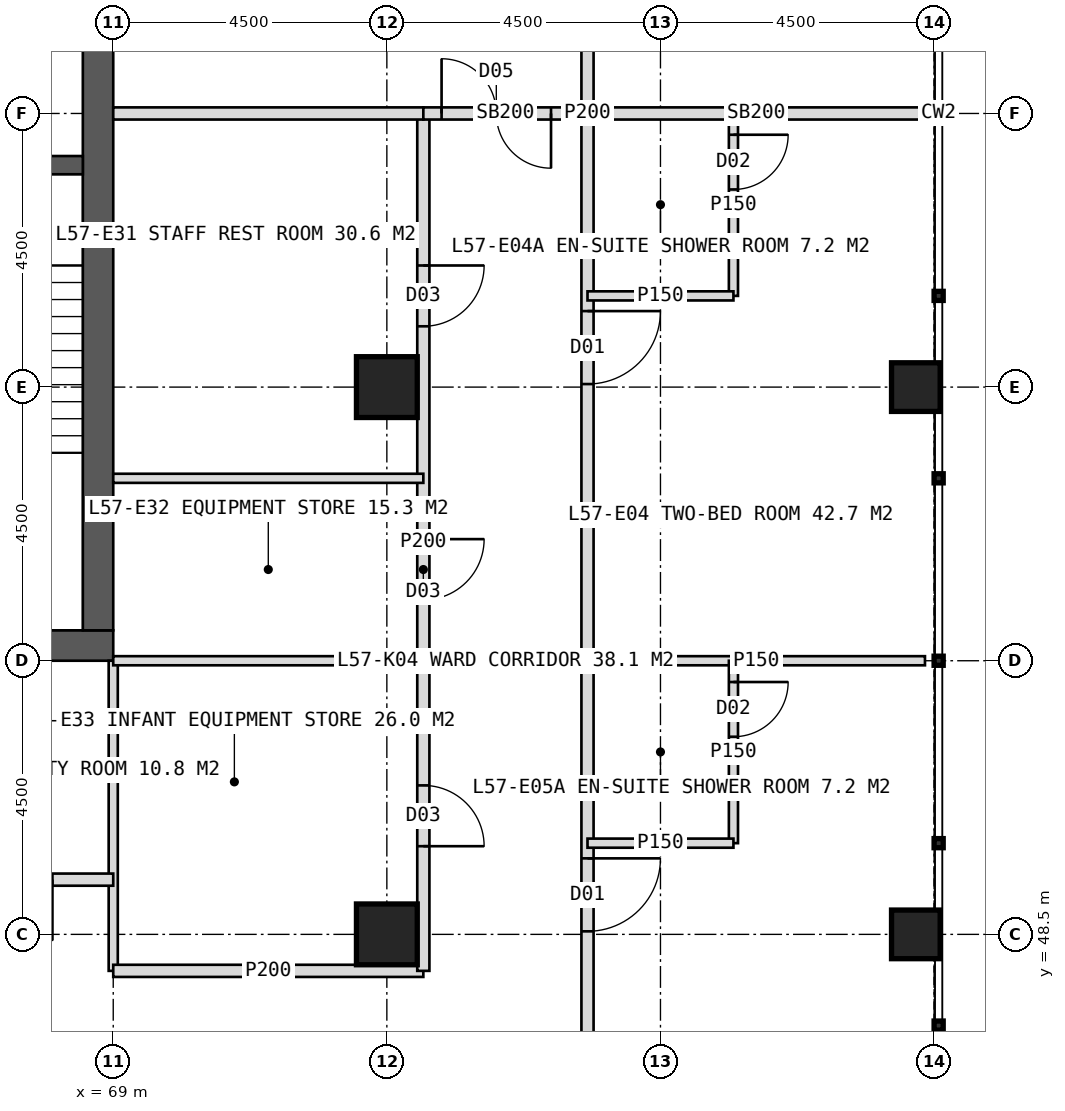
"""IFC4 building model, lengths in metres.
Left out: names, types, materials, properties, quantities, classifications, styles, units other than length and angle.
Written with IfcOpenShell. Run it as: python <this file> out.ifc"""

import sys

from ifc_helpers import new_model, si_unit, direction, frame, frame_2d, origin, origin_2d, place, context, subcontext, project, spatial, rectangle, hollow_rectangle, extrude, element, fill, save


model = new_model("IFC4")
c1 = context("Model", 3, precision=1e-05, world=origin(), true_north=direction((0.0, 1.0)))
c2 = subcontext(c1, "Body", "Model", "MODEL_VIEW")
j1 = project(units=[si_unit("LENGTHUNIT", "METRE"), si_unit("PLANEANGLEUNIT", "RADIAN")], contexts=[c1])
p1 = place(None, origin())
s1 = spatial("IfcSite", under=j1, at=p1, CompositionType="ELEMENT")
p2 = place(p1, origin())
s2 = spatial("IfcBuilding", under=s1, at=p2, CompositionType="ELEMENT")
p3 = place(p2, frame((0.0, 0.0, 237.0)))
s3 = spatial("IfcBuildingStorey", under=s2, at=p3, CompositionType="ELEMENT", Elevation=237.0)
p4 = place(p3, frame((51.0, 53.25, 0.0), z_axis=(0.0, 0.0, 1.0), x_axis=(1.0, 0.0, 0.0)))
e1 = element("IfcWall", 1, at=p4, inside=s3, PredefinedType="SHEAR", context=c2, shape_type="SweptSolid", body=[
    extrude(rectangle(XDim=18.0, YDim=0.5, at=frame_2d((9.0, 0.0))), origin(), (0.0, 0.0, 1.0), 4.0),
])
p5 = place(p4, frame((8.1, 0.0, 0.0)))
e2 = element("IfcOpeningElement", 2, at=p5, cuts=e1, PredefinedType="OPENING", context=c2, shape_type="SweptSolid", body=[
    extrude(rectangle(XDim=1.8, YDim=2.2, at=frame_2d((0.9, 1.1))), frame((0.0, 0.26, 0.0), z_axis=(0.0, -1.0, 0.0), x_axis=(1.0, 0.0, 0.0)), (0.0, 0.0, 1.0), 0.52),
])
p6 = place(p3, frame((68.75, 53.5, 0.0), z_axis=(0.0, 0.0, 1.0), x_axis=(0.0, 1.0, 0.0)))
e3 = element("IfcWall", 3, at=p6, inside=s3, PredefinedType="SHEAR", context=c2, shape_type="SweptSolid", body=[
    extrude(rectangle(XDim=17.0, YDim=0.5, at=frame_2d((8.5, 0.0))), origin(), (0.0, 0.0, 1.0), 4.0),
])
p7 = place(p6, frame((9.6, 0.0, 0.0)))
e4 = element("IfcOpeningElement", 4, at=p7, cuts=e3, PredefinedType="OPENING", context=c2, shape_type="SweptSolid", body=[
    extrude(rectangle(XDim=1.5, YDim=2.2, at=frame_2d((0.75, 1.1))), frame((0.0, 0.26, 0.0), z_axis=(0.0, -1.0, 0.0), x_axis=(1.0, 0.0, 0.0)), (0.0, 0.0, 1.0), 0.52),
])
p8 = place(p3, frame((65.2, 61.15, 0.0), z_axis=(0.0, 0.0, 1.0), x_axis=(1.0, 0.0, 0.0)))
e5 = element("IfcWall", 5, at=p8, inside=s3, PredefinedType="SHEAR", context=c2, shape_type="SweptSolid", body=[
    extrude(rectangle(XDim=3.3, YDim=0.3, at=frame_2d((1.65, 0.0))), origin(), (0.0, 0.0, 1.0), 4.0),
])
p9 = place(p8, frame((1.05, 0.0, 0.0)))
e6 = element("IfcOpeningElement", 6, at=p9, cuts=e5, PredefinedType="OPENING", context=c2, shape_type="SweptSolid", body=[
    extrude(rectangle(XDim=1.2, YDim=2.1, at=frame_2d((0.6, 1.05))), frame((0.0, 0.16, 0.0), z_axis=(0.0, -1.0, 0.0), x_axis=(1.0, 0.0, 0.0)), (0.0, 0.0, 1.0), 0.32),
])
for number, where, z_axis, x_axis in (
    (7, (73.5, 48.5, 0.0), (0.0, 0.0, 1.0), (1.0, 0.0, 0.0)),
    (8, (73.5, 57.5, 0.0), (0.0, 0.0, 1.0), (1.0, 0.0, 0.0)),
):
    element("IfcColumn", number, at=place(p3, frame(where, z_axis=z_axis, x_axis=x_axis)), inside=s3, PredefinedType="COLUMN", context=c2, shape_type="SweptSolid", body=[
        extrude(hollow_rectangle(XDim=1.0, YDim=1.0, WallThickness=0.1, at=origin_2d()), origin(), (0.0, 0.0, 1.0), 4.0),
    ])
for number, where, z_axis, x_axis in (
    (9, (82.2, 48.5, 0.0), (0.0, 0.0, 1.0), (1.0, 0.0, 0.0)),
    (10, (82.2, 57.5, 0.0), (0.0, 0.0, 1.0), (1.0, 0.0, 0.0)),
):
    element("IfcColumn", number, at=place(p3, frame(where, z_axis=z_axis, x_axis=x_axis)), inside=s3, PredefinedType="COLUMN", context=c2, shape_type="SweptSolid", body=[
        extrude(hollow_rectangle(XDim=0.8, YDim=0.8, WallThickness=0.08, at=origin_2d()), origin(), (0.0, 0.0, 1.0), 4.0),
    ])
p10 = place(p3, frame((69.0, 53.0, 0.0), z_axis=(0.0, 0.0, 1.0), x_axis=(0.0, -1.0, 0.0)))
e11 = element("IfcWall", 11, at=p10, inside=s3, PredefinedType="PARTITIONING", context=c2, shape_type="SweptSolid", body=[
    extrude(rectangle(XDim=5.1, YDim=0.15, at=frame_2d((2.55, 0.0))), origin(), (0.0, 0.0, 1.0), 3.75),
])
p11 = place(p3, frame((74.1, 47.9, 0.0), z_axis=(0.0, 0.0, 1.0), x_axis=(-1.0, 0.0, 0.0)))
e12 = element("IfcWall", 12, at=p11, inside=s3, PredefinedType="PARTITIONING", context=c2, shape_type="SweptSolid", body=[
    extrude(rectangle(XDim=5.1, YDim=0.2, at=frame_2d((2.55, 0.0))), origin(), (0.0, 0.0, 1.0), 3.75),
])
p12 = place(p3, frame((69.0, 49.4, 0.0), z_axis=(0.0, 0.0, 1.0), x_axis=(-1.0, 0.0, 0.0)))
e13 = element("IfcWall", 13, at=p12, inside=s3, PredefinedType="PARTITIONING", context=c2, shape_type="SweptSolid", body=[
    extrude(rectangle(XDim=6.75, YDim=0.2, at=frame_2d((3.375, 0.0))), origin(), (0.0, 0.0, 1.0), 3.75),
])
p13 = place(p12, frame((1.0, 0.0, 0.0)))
e14 = element("IfcOpeningElement", 14, at=p13, cuts=e13, PredefinedType="OPENING", context=c2, shape_type="SweptSolid", body=[
    extrude(rectangle(XDim=1.0, YDim=2.1, at=frame_2d((0.5, 1.05))), frame((0.0, 0.11, 0.0), z_axis=(0.0, -1.0, 0.0), x_axis=(1.0, 0.0, 0.0)), (0.0, 0.0, 1.0), 0.22),
])
p14 = place(p12, frame((5.425, 0.0, 0.0)))
e15 = element("IfcOpeningElement", 15, at=p14, cuts=e13, PredefinedType="OPENING", context=c2, shape_type="SweptSolid", body=[
    extrude(rectangle(XDim=1.0, YDim=2.1, at=frame_2d((0.5, 1.05))), frame((0.0, 0.11, 0.0), z_axis=(0.0, -1.0, 0.0), x_axis=(1.0, 0.0, 0.0)), (0.0, 0.0, 1.0), 0.22),
])
p15 = place(p3, frame((76.8, 62.0, 0.0), z_axis=(0.0, 0.0, 1.0), x_axis=(1.0, 0.0, 0.0)))
e16 = element("IfcWall", 16, at=p15, inside=s3, PredefinedType="SOLIDWALL", context=c2, shape_type="SweptSolid", body=[
    extrude(rectangle(XDim=5.55, YDim=0.2, at=frame_2d((2.775, 0.0))), origin(), (0.0, 0.0, 1.0), 2.95),
])
p16 = place(p3, frame((76.8, 53.0, 0.0), z_axis=(0.0, 0.0, 1.0), x_axis=(1.0, 0.0, 0.0)))
e17 = element("IfcWall", 17, at=p16, inside=s3, PredefinedType="PARTITIONING", context=c2, shape_type="SweptSolid", body=[
    extrude(rectangle(XDim=5.55, YDim=0.15, at=frame_2d((2.775, 0.0))), origin(), (0.0, 0.0, 1.0), 3.75),
])
p17 = place(p3, frame((76.8, 78.8, 0.0), z_axis=(0.0, 0.0, 1.0), x_axis=(0.0, -1.0, 0.0)))
e18 = element("IfcWall", 18, at=p17, inside=s3, PredefinedType="PARTITIONING", context=c2, shape_type="SweptSolid", body=[
    extrude(rectangle(XDim=33.6, YDim=0.2, at=frame_2d((16.8, 0.0))), origin(), (0.0, 0.0, 1.0), 3.75),
])
p18 = place(p17, frame((2.65, 0.0, 0.0)))
e19 = element("IfcOpeningElement", 19, at=p18, cuts=e18, PredefinedType="OPENING", context=c2, shape_type="SweptSolid", body=[
    extrude(rectangle(XDim=1.2, YDim=2.2, at=frame_2d((0.6, 1.1))), frame((0.0, 0.11, 0.0), z_axis=(0.0, -1.0, 0.0), x_axis=(1.0, 0.0, 0.0)), (0.0, 0.0, 1.0), 0.22),
])
p19 = place(p17, frame((7.45, 0.0, 0.0)))
e20 = element("IfcOpeningElement", 20, at=p19, cuts=e18, PredefinedType="OPENING", context=c2, shape_type="SweptSolid", body=[
    extrude(rectangle(XDim=1.2, YDim=2.2, at=frame_2d((0.6, 1.1))), frame((0.0, 0.11, 0.0), z_axis=(0.0, -1.0, 0.0), x_axis=(1.0, 0.0, 0.0)), (0.0, 0.0, 1.0), 0.22),
])
p20 = place(p17, frame((13.45, 0.0, 0.0)))
e21 = element("IfcOpeningElement", 21, at=p20, cuts=e18, PredefinedType="OPENING", context=c2, shape_type="SweptSolid", body=[
    extrude(rectangle(XDim=1.2, YDim=2.2, at=frame_2d((0.6, 1.1))), frame((0.0, 0.11, 0.0), z_axis=(0.0, -1.0, 0.0), x_axis=(1.0, 0.0, 0.0)), (0.0, 0.0, 1.0), 0.22),
])
p21 = place(p17, frame((20.05, 0.0, 0.0)))
e22 = element("IfcOpeningElement", 22, at=p21, cuts=e18, PredefinedType="OPENING", context=c2, shape_type="SweptSolid", body=[
    extrude(rectangle(XDim=1.2, YDim=2.2, at=frame_2d((0.6, 1.1))), frame((0.0, 0.11, 0.0), z_axis=(0.0, -1.0, 0.0), x_axis=(1.0, 0.0, 0.0)), (0.0, 0.0, 1.0), 0.22),
])
p22 = place(p17, frame((29.05, 0.0, 0.0)))
e23 = element("IfcOpeningElement", 23, at=p22, cuts=e18, PredefinedType="OPENING", context=c2, shape_type="SweptSolid", body=[
    extrude(rectangle(XDim=1.2, YDim=2.2, at=frame_2d((0.6, 1.1))), frame((0.0, 0.11, 0.0), z_axis=(0.0, -1.0, 0.0), x_axis=(1.0, 0.0, 0.0)), (0.0, 0.0, 1.0), 0.22),
])
p23 = place(p3, frame((79.2, 62.0, 0.0), z_axis=(0.0, 0.0, 1.0), x_axis=(0.0, -1.0, 0.0)))
e24 = element("IfcWall", 24, at=p23, inside=s3, PredefinedType="PARTITIONING", context=c2, shape_type="SweptSolid", body=[
    extrude(rectangle(XDim=3.0, YDim=0.15, at=frame_2d((1.5, 0.0))), origin(), (0.0, 0.0, 1.0), 3.75),
])
p24 = place(p23, frame((0.35, 0.0, 0.0)))
e25 = element("IfcOpeningElement", 25, at=p24, cuts=e24, PredefinedType="OPENING", context=c2, shape_type="SweptSolid", body=[
    extrude(rectangle(XDim=0.9, YDim=2.1, at=frame_2d((0.45, 1.05))), frame((0.0, 0.085, 0.0), z_axis=(0.0, -1.0, 0.0), x_axis=(1.0, 0.0, 0.0)), (0.0, 0.0, 1.0), 0.17),
])
p25 = place(p3, frame((76.8, 59.0, 0.0), z_axis=(0.0, 0.0, 1.0), x_axis=(1.0, 0.0, 0.0)))
e26 = element("IfcWall", 26, at=p25, inside=s3, PredefinedType="PARTITIONING", context=c2, shape_type="SweptSolid", body=[
    extrude(rectangle(XDim=2.4, YDim=0.15, at=frame_2d((1.2, 0.0))), origin(), (0.0, 0.0, 1.0), 3.75),
])
p26 = place(p3, frame((79.2, 53.0, 0.0), z_axis=(0.0, 0.0, 1.0), x_axis=(0.0, -1.0, 0.0)))
e27 = element("IfcWall", 27, at=p26, inside=s3, PredefinedType="PARTITIONING", context=c2, shape_type="SweptSolid", body=[
    extrude(rectangle(XDim=3.0, YDim=0.15, at=frame_2d((1.5, 0.0))), origin(), (0.0, 0.0, 1.0), 3.75),
])
p27 = place(p26, frame((0.35, 0.0, 0.0)))
e28 = element("IfcOpeningElement", 28, at=p27, cuts=e27, PredefinedType="OPENING", context=c2, shape_type="SweptSolid", body=[
    extrude(rectangle(XDim=0.9, YDim=2.1, at=frame_2d((0.45, 1.05))), frame((0.0, 0.085, 0.0), z_axis=(0.0, -1.0, 0.0), x_axis=(1.0, 0.0, 0.0)), (0.0, 0.0, 1.0), 0.17),
])
p28 = place(p3, frame((76.8, 50.0, 0.0), z_axis=(0.0, 0.0, 1.0), x_axis=(1.0, 0.0, 0.0)))
e29 = element("IfcWall", 29, at=p28, inside=s3, PredefinedType="PARTITIONING", context=c2, shape_type="SweptSolid", body=[
    extrude(rectangle(XDim=2.4, YDim=0.15, at=frame_2d((1.2, 0.0))), origin(), (0.0, 0.0, 1.0), 3.75),
])
p29 = place(p3, frame((74.1, 62.0, 0.0), z_axis=(0.0, 0.0, 1.0), x_axis=(0.0, -1.0, 0.0)))
e30 = element("IfcWall", 30, at=p29, inside=s3, PredefinedType="PARTITIONING", context=c2, shape_type="SweptSolid", body=[
    extrude(rectangle(XDim=14.1, YDim=0.2, at=frame_2d((7.05, 0.0))), origin(), (0.0, 0.0, 1.0), 3.75),
])
p30 = place(p29, frame((2.5, 0.0, 0.0)))
e31 = element("IfcOpeningElement", 31, at=p30, cuts=e30, PredefinedType="OPENING", context=c2, shape_type="SweptSolid", body=[
    extrude(rectangle(XDim=1.0, YDim=2.1, at=frame_2d((0.5, 1.05))), frame((0.0, 0.11, 0.0), z_axis=(0.0, -1.0, 0.0), x_axis=(1.0, 0.0, 0.0)), (0.0, 0.0, 1.0), 0.22),
])
p31 = place(p29, frame((7.0, 0.0, 0.0)))
e32 = element("IfcOpeningElement", 32, at=p31, cuts=e30, PredefinedType="OPENING", context=c2, shape_type="SweptSolid", body=[
    extrude(rectangle(XDim=1.0, YDim=2.1, at=frame_2d((0.5, 1.05))), frame((0.0, 0.11, 0.0), z_axis=(0.0, -1.0, 0.0), x_axis=(1.0, 0.0, 0.0)), (0.0, 0.0, 1.0), 0.22),
])
p32 = place(p29, frame((11.05, 0.0, 0.0)))
e33 = element("IfcOpeningElement", 33, at=p32, cuts=e30, PredefinedType="OPENING", context=c2, shape_type="SweptSolid", body=[
    extrude(rectangle(XDim=1.0, YDim=2.1, at=frame_2d((0.5, 1.05))), frame((0.0, 0.11, 0.0), z_axis=(0.0, -1.0, 0.0), x_axis=(1.0, 0.0, 0.0)), (0.0, 0.0, 1.0), 0.22),
])
p33 = place(p3, frame((69.0, 62.0, 0.0), z_axis=(0.0, 0.0, 1.0), x_axis=(1.0, 0.0, 0.0)))
e34 = element("IfcWall", 34, at=p33, inside=s3, PredefinedType="SOLIDWALL", context=c2, shape_type="SweptSolid", body=[
    extrude(rectangle(XDim=5.1, YDim=0.2, at=frame_2d((2.55, 0.0))), origin(), (0.0, 0.0, 1.0), 2.95),
])
for number, where, z_axis, x_axis in (
    (35, (69.0, 56.0, 0.0), (0.0, 0.0, 1.0), (1.0, 0.0, 0.0)),
    (36, (69.0, 53.0, 0.0), (0.0, 0.0, 1.0), (1.0, 0.0, 0.0)),
):
    element("IfcWall", number, at=place(p3, frame(where, z_axis=z_axis, x_axis=x_axis)), inside=s3, PredefinedType="PARTITIONING", context=c2, shape_type="SweptSolid", body=[
        extrude(rectangle(XDim=5.1, YDim=0.15, at=frame_2d((2.55, 0.0))), origin(), (0.0, 0.0, 1.0), 3.75),
    ])
p34 = place(p3, frame((74.1, 62.0, 0.0), z_axis=(0.0, 0.0, 1.0), x_axis=(1.0, 0.0, 0.0)))
e37 = element("IfcWall", 37, at=p34, inside=s3, PredefinedType="SOLIDWALL", context=c2, shape_type="SweptSolid", body=[
    extrude(rectangle(XDim=2.7, YDim=0.2, at=frame_2d((1.35, 0.0))), origin(), (0.0, 0.0, 1.0), 2.95),
])
p35 = place(p34, frame((0.3, 0.0, 0.0)))
e38 = element("IfcOpeningElement", 38, at=p35, cuts=e37, PredefinedType="OPENING", context=c2, shape_type="SweptSolid", body=[
    extrude(rectangle(XDim=1.8, YDim=2.2, at=frame_2d((0.9, 1.1))), frame((0.0, 0.11, 0.0), z_axis=(0.0, -1.0, 0.0), x_axis=(1.0, 0.0, 0.0)), (0.0, 0.0, 1.0), 0.22),
])
p36 = place(p21, origin())
e39 = element("IfcDoor", 39, at=p36, inside=s3, OperationType="SINGLE_SWING_LEFT", PredefinedType="DOOR", context=c2, shape_type="SweptSolid", body=[
    extrude(rectangle(XDim=1.2, YDim=2.2, at=frame_2d((0.6, 1.1))), frame((0.0, 0.025, 0.0), z_axis=(0.0, -1.0, 0.0), x_axis=(1.0, 0.0, 0.0)), (0.0, 0.0, 1.0), 0.05),
])
fill(e22, e39)
p37 = place(p24, origin())
e40 = element("IfcDoor", 40, at=p37, inside=s3, OperationType="SINGLE_SWING_LEFT", PredefinedType="DOOR", context=c2, shape_type="SweptSolid", body=[
    extrude(rectangle(XDim=0.9, YDim=2.1, at=frame_2d((0.45, 1.05))), frame((0.0, 0.025, 0.0), z_axis=(0.0, -1.0, 0.0), x_axis=(1.0, 0.0, 0.0)), (0.0, 0.0, 1.0), 0.05),
])
fill(e25, e40)
p38 = place(p22, origin())
e41 = element("IfcDoor", 41, at=p38, inside=s3, OperationType="SINGLE_SWING_LEFT", PredefinedType="DOOR", context=c2, shape_type="SweptSolid", body=[
    extrude(rectangle(XDim=1.2, YDim=2.2, at=frame_2d((0.6, 1.1))), frame((0.0, 0.025, 0.0), z_axis=(0.0, -1.0, 0.0), x_axis=(1.0, 0.0, 0.0)), (0.0, 0.0, 1.0), 0.05),
])
fill(e23, e41)
p39 = place(p27, origin())
e42 = element("IfcDoor", 42, at=p39, inside=s3, OperationType="SINGLE_SWING_LEFT", PredefinedType="DOOR", context=c2, shape_type="SweptSolid", body=[
    extrude(rectangle(XDim=0.9, YDim=2.1, at=frame_2d((0.45, 1.05))), frame((0.0, 0.025, 0.0), z_axis=(0.0, -1.0, 0.0), x_axis=(1.0, 0.0, 0.0)), (0.0, 0.0, 1.0), 0.05),
])
fill(e28, e42)
p40 = place(p30, origin())
e43 = element("IfcDoor", 43, at=p40, inside=s3, OperationType="SINGLE_SWING_LEFT", PredefinedType="DOOR", context=c2, shape_type="SweptSolid", body=[
    extrude(rectangle(XDim=1.0, YDim=2.1, at=frame_2d((0.5, 1.05))), frame((0.0, 0.025, 0.0), z_axis=(0.0, -1.0, 0.0), x_axis=(1.0, 0.0, 0.0)), (0.0, 0.0, 1.0), 0.05),
])
fill(e31, e43)
p41 = place(p31, origin())
e44 = element("IfcDoor", 44, at=p41, inside=s3, OperationType="SINGLE_SWING_LEFT", PredefinedType="DOOR", context=c2, shape_type="SweptSolid", body=[
    extrude(rectangle(XDim=1.0, YDim=2.1, at=frame_2d((0.5, 1.05))), frame((0.0, 0.025, 0.0), z_axis=(0.0, -1.0, 0.0), x_axis=(1.0, 0.0, 0.0)), (0.0, 0.0, 1.0), 0.05),
])
fill(e32, e44)
p42 = place(p32, origin())
e45 = element("IfcDoor", 45, at=p42, inside=s3, OperationType="SINGLE_SWING_RIGHT", PredefinedType="DOOR", context=c2, shape_type="SweptSolid", body=[
    extrude(rectangle(XDim=1.0, YDim=2.1, at=frame_2d((0.5, 1.05))), frame((0.0, 0.025, 0.0), z_axis=(0.0, -1.0, 0.0), x_axis=(1.0, 0.0, 0.0)), (0.0, 0.0, 1.0), 0.05),
])
fill(e33, e45)
p43 = place(p35, origin())
e46 = element("IfcDoor", 46, at=p43, inside=s3, OperationType="DOUBLE_DOOR_DOUBLE_SWING", PredefinedType="DOOR", context=c2, shape_type="SweptSolid", body=[
    extrude(rectangle(XDim=1.8, YDim=2.2, at=frame_2d((0.9, 1.1))), frame((0.0, 0.025, 0.0), z_axis=(0.0, -1.0, 0.0), x_axis=(1.0, 0.0, 0.0)), (0.0, 0.0, 1.0), 0.05),
])
fill(e38, e46)
save(model, sys.argv[1])
